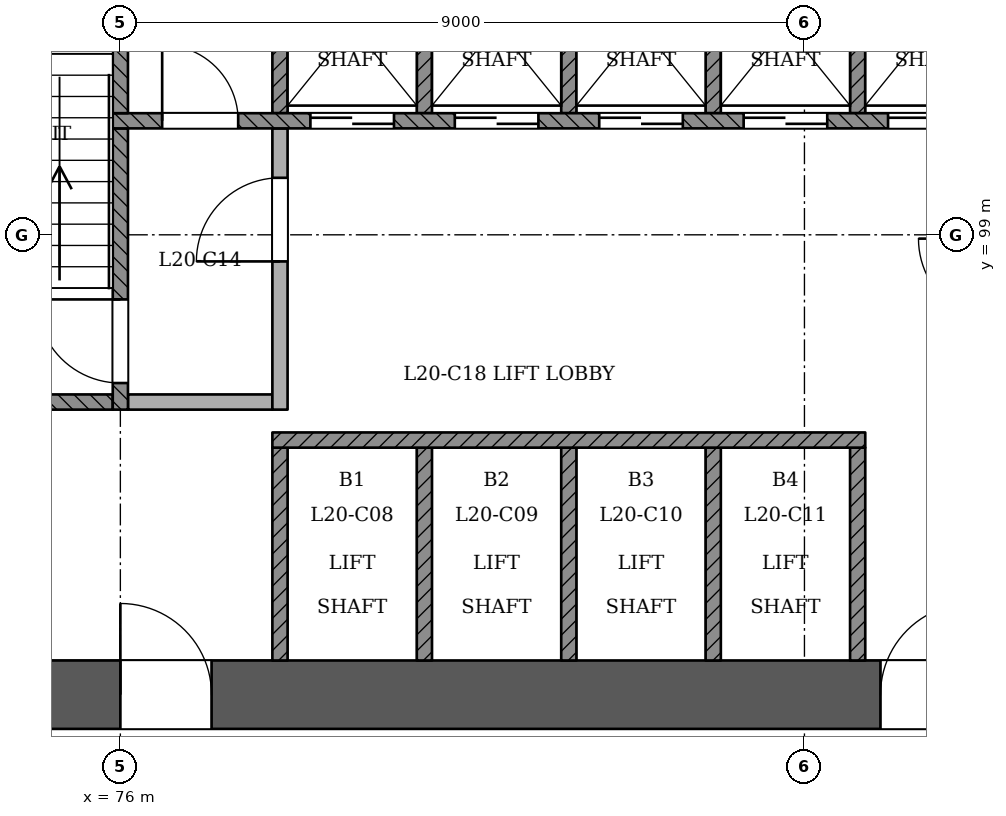
"""IFC4 building model, lengths in metres.
Left out: names, types, materials, properties, quantities, classifications, styles, units other than length and angle.
Written with IfcOpenShell. Run it as: python <this file> out.ifc"""

import sys

from ifc_helpers import new_model, si_unit, direction, frame, frame_2d, origin, place, context, subcontext, project, spatial, rectangle, extrude, element, fill, save


model = new_model("IFC4")
c1 = context("Model", 3, precision=1e-05, world=origin(), true_north=direction((0.0, 1.0)))
c2 = subcontext(c1, "Body", "Model", "MODEL_VIEW")
j1 = project(units=[si_unit("LENGTHUNIT", "METRE"), si_unit("PLANEANGLEUNIT", "RADIAN")], contexts=[c1])
p1 = place(None, origin())
s1 = spatial("IfcSite", under=j1, at=p1, CompositionType="ELEMENT")
p2 = place(p1, origin())
s2 = spatial("IfcBuilding", under=s1, at=p2, CompositionType="ELEMENT")
p3 = place(p2, frame((0.0, 0.0, 81.0)))
s3 = spatial("IfcBuildingStorey", under=s2, at=p3, CompositionType="ELEMENT", Elevation=81.0)
p4 = place(p3, frame((72.55, 92.95, 0.0), z_axis=(0.0, 0.0, 1.0), x_axis=(1.0, 0.0, 0.0)))
e1 = element("IfcWall", 1, at=p4, inside=s3, PredefinedType="SHEAR", context=c2, shape_type="SweptSolid", body=[
    extrude(rectangle(XDim=25.35, YDim=0.9, at=frame_2d((12.675, 0.0))), origin(), (0.0, 0.0, 1.0), 3.6),
])
p5 = place(p4, frame((1.25, 0.0, 0.0)))
e2 = element("IfcOpeningElement", 2, at=p5, cuts=e1, PredefinedType="OPENING", context=c2, shape_type="SweptSolid", body=[
    extrude(rectangle(XDim=1.2, YDim=2.1, at=frame_2d((0.6, 1.05))), frame((0.0, 0.46, 0.0), z_axis=(0.0, -1.0, 0.0), x_axis=(1.0, 0.0, 0.0)), (0.0, 0.0, 1.0), 0.921),
])
p6 = place(p4, frame((3.45, 0.0, 0.0)))
e3 = element("IfcOpeningElement", 3, at=p6, cuts=e1, PredefinedType="OPENING", context=c2, shape_type="SweptSolid", body=[
    extrude(rectangle(XDim=1.2, YDim=2.1, at=frame_2d((0.6, 1.05))), frame((0.0, 0.46, 0.0), z_axis=(0.0, -1.0, 0.0), x_axis=(1.0, 0.0, 0.0)), (0.0, 0.0, 1.0), 0.921),
])
p7 = place(p4, frame((13.45, 0.0, 0.0)))
e4 = element("IfcOpeningElement", 4, at=p7, cuts=e1, PredefinedType="OPENING", context=c2, shape_type="SweptSolid", body=[
    extrude(rectangle(XDim=1.2, YDim=2.1, at=frame_2d((0.6, 1.05))), frame((0.0, 0.46, 0.0), z_axis=(0.0, -1.0, 0.0), x_axis=(1.0, 0.0, 0.0)), (0.0, 0.0, 1.0), 0.921),
])
p8 = place(p4, frame((15.913, 0.0, 0.0)))
e5 = element("IfcOpeningElement", 5, at=p8, cuts=e1, PredefinedType="OPENING", context=c2, shape_type="SweptSolid", body=[
    extrude(rectangle(XDim=1.0, YDim=2.1, at=frame_2d((0.5, 1.05))), frame((0.0, 0.46, 0.0), z_axis=(0.0, -1.0, 0.0), x_axis=(1.0, 0.0, 0.0)), (0.0, 0.0, 1.0), 0.921),
])
p9 = place(p4, frame((18.35, 0.0, 0.0)))
e6 = element("IfcOpeningElement", 6, at=p9, cuts=e1, PredefinedType="OPENING", context=c2, shape_type="SweptSolid", body=[
    extrude(rectangle(XDim=1.0, YDim=2.1, at=frame_2d((0.5, 1.05))), frame((0.0, 0.46, 0.0), z_axis=(0.0, -1.0, 0.0), x_axis=(1.0, 0.0, 0.0)), (0.0, 0.0, 1.0), 0.921),
])
p10 = place(p4, frame((20.7, 0.0, 0.0)))
e7 = element("IfcOpeningElement", 7, at=p10, cuts=e1, PredefinedType="OPENING", context=c2, shape_type="SweptSolid", body=[
    extrude(rectangle(XDim=1.0, YDim=2.1, at=frame_2d((0.5, 1.05))), frame((0.0, 0.46, 0.0), z_axis=(0.0, -1.0, 0.0), x_axis=(1.0, 0.0, 0.0)), (0.0, 0.0, 1.0), 0.921),
])
p11 = place(p4, frame((22.988, 0.0, 0.0)))
e8 = element("IfcOpeningElement", 8, at=p11, cuts=e1, PredefinedType="OPENING", context=c2, shape_type="SweptSolid", body=[
    extrude(rectangle(XDim=1.0, YDim=2.1, at=frame_2d((0.5, 1.05))), frame((0.0, 0.46, 0.0), z_axis=(0.0, -1.0, 0.0), x_axis=(1.0, 0.0, 0.0)), (0.0, 0.0, 1.0), 0.921),
])
p12 = place(p3, frame((62.955, 97.34, 0.0), z_axis=(0.0, 0.0, 1.0), x_axis=(0.500000604257, -0.866025054916, 0.0)))
e9 = element("IfcWall", 9, at=p12, inside=s3, PredefinedType="PARTITIONING", context=c2, shape_type="SweptSolid", body=[
    extrude(rectangle(XDim=42.75, YDim=0.15, at=frame_2d((21.375, 0.0))), origin(), (0.0, 0.0, 1.0), 2.7),
])
p13 = place(p12, frame((0.245, 0.0, 0.0)))
e10 = element("IfcOpeningElement", 10, at=p13, cuts=e9, PredefinedType="OPENING", context=c2, shape_type="SweptSolid", body=[
    extrude(rectangle(XDim=1.2, YDim=2.1, at=frame_2d((0.6, 1.05))), frame((0.0, 0.085, 0.0), z_axis=(0.0, -1.0, 0.0), x_axis=(1.0, 0.0, 0.0)), (0.0, 0.0, 1.0), 0.171),
])
p14 = place(p12, frame((8.375, 0.0, 0.0)))
e11 = element("IfcOpeningElement", 11, at=p14, cuts=e9, PredefinedType="OPENING", context=c2, shape_type="SweptSolid", body=[
    extrude(rectangle(XDim=1.2, YDim=2.1, at=frame_2d((0.6, 1.05))), frame((0.0, 0.085, 0.0), z_axis=(0.0, -1.0, 0.0), x_axis=(1.0, 0.0, 0.0)), (0.0, 0.0, 1.0), 0.171),
])
p15 = place(p12, frame((14.125, 0.0, 0.0)))
e12 = element("IfcOpeningElement", 12, at=p15, cuts=e9, PredefinedType="OPENING", context=c2, shape_type="SweptSolid", body=[
    extrude(rectangle(XDim=1.0, YDim=2.1, at=frame_2d((0.5, 1.05))), frame((0.0, 0.085, 0.0), z_axis=(0.0, -1.0, 0.0), x_axis=(1.0, 0.0, 0.0)), (0.0, 0.0, 1.0), 0.171),
])
p16 = place(p12, frame((18.625, 0.0, 0.0)))
e13 = element("IfcOpeningElement", 13, at=p16, cuts=e9, PredefinedType="OPENING", context=c2, shape_type="SweptSolid", body=[
    extrude(rectangle(XDim=1.0, YDim=2.1, at=frame_2d((0.5, 1.05))), frame((0.0, 0.085, 0.0), z_axis=(0.0, -1.0, 0.0), x_axis=(1.0, 0.0, 0.0)), (0.0, 0.0, 1.0), 0.171),
])
p17 = place(p12, frame((26.375, 0.0, 0.0)))
e14 = element("IfcOpeningElement", 14, at=p17, cuts=e9, PredefinedType="OPENING", context=c2, shape_type="SweptSolid", body=[
    extrude(rectangle(XDim=1.2, YDim=2.1, at=frame_2d((0.6, 1.05))), frame((0.0, 0.085, 0.0), z_axis=(0.0, -1.0, 0.0), x_axis=(1.0, 0.0, 0.0)), (0.0, 0.0, 1.0), 0.171),
])
p18 = place(p12, frame((30.946, 0.0, 0.0)))
e15 = element("IfcOpeningElement", 15, at=p18, cuts=e9, PredefinedType="OPENING", context=c2, shape_type="SweptSolid", body=[
    extrude(rectangle(XDim=1.1, YDim=2.1, at=frame_2d((0.55, 1.05))), frame((0.0, 0.085, 0.0), z_axis=(0.0, -1.0, 0.0), x_axis=(1.0, 0.0, 0.0)), (0.0, 0.0, 1.0), 0.171),
])
p19 = place(p12, frame((36.625, 0.0, 0.0)))
e16 = element("IfcOpeningElement", 16, at=p19, cuts=e9, PredefinedType="OPENING", context=c2, shape_type="SweptSolid", body=[
    extrude(rectangle(XDim=1.0, YDim=2.1, at=frame_2d((0.5, 1.05))), frame((0.0, 0.085, 0.0), z_axis=(0.0, -1.0, 0.0), x_axis=(1.0, 0.0, 0.0)), (0.0, 0.0, 1.0), 0.171),
])
p20 = place(p12, frame((41.329, 0.0, 0.0)))
e17 = element("IfcOpeningElement", 17, at=p20, cuts=e9, PredefinedType="OPENING", context=c2, shape_type="SweptSolid", body=[
    extrude(rectangle(XDim=1.2, YDim=2.1, at=frame_2d((0.6, 1.05))), frame((0.0, 0.085, 0.0), z_axis=(0.0, -1.0, 0.0), x_axis=(1.0, 0.0, 0.0)), (0.0, 0.0, 1.0), 0.171),
])
p21 = place(p3, frame((85.67, 60.317, 0.0), z_axis=(0.0, 0.0, 1.0), x_axis=(0.499998839017, 0.866026074077, 0.0)))
e18 = element("IfcWall", 18, at=p21, inside=s3, PredefinedType="PARTITIONING", context=c2, shape_type="SweptSolid", body=[
    extrude(rectangle(XDim=41.239, YDim=0.15, at=frame_2d((20.62, 0.0))), origin(), (0.0, 0.0, 1.0), 2.7),
])
p22 = place(p21, frame((3.246, 0.0, 0.0)))
e19 = element("IfcOpeningElement", 19, at=p22, cuts=e18, PredefinedType="OPENING", context=c2, shape_type="SweptSolid", body=[
    extrude(rectangle(XDim=1.2, YDim=2.1, at=frame_2d((0.6, 1.05))), frame((0.0, 0.085, 0.0), z_axis=(0.0, -1.0, 0.0), x_axis=(1.0, 0.0, 0.0)), (0.0, 0.0, 1.0), 0.171),
])
p23 = place(p21, frame((10.771, 0.0, 0.0)))
e20 = element("IfcOpeningElement", 20, at=p23, cuts=e18, PredefinedType="OPENING", context=c2, shape_type="SweptSolid", body=[
    extrude(rectangle(XDim=1.0, YDim=2.1, at=frame_2d((0.5, 1.05))), frame((0.0, 0.085, 0.0), z_axis=(0.0, -1.0, 0.0), x_axis=(1.0, 0.0, 0.0)), (0.0, 0.0, 1.0), 0.171),
])
p24 = place(p21, frame((14.125, 0.0, 0.0)))
e21 = element("IfcOpeningElement", 21, at=p24, cuts=e18, PredefinedType="OPENING", context=c2, shape_type="SweptSolid", body=[
    extrude(rectangle(XDim=1.0, YDim=2.1, at=frame_2d((0.5, 1.05))), frame((0.0, 0.085, 0.0), z_axis=(0.0, -1.0, 0.0), x_axis=(1.0, 0.0, 0.0)), (0.0, 0.0, 1.0), 0.171),
])
p25 = place(p21, frame((19.771, 0.0, 0.0)))
e22 = element("IfcOpeningElement", 22, at=p25, cuts=e18, PredefinedType="OPENING", context=c2, shape_type="SweptSolid", body=[
    extrude(rectangle(XDim=1.0, YDim=2.1, at=frame_2d((0.5, 1.05))), frame((0.0, 0.085, 0.0), z_axis=(0.0, -1.0, 0.0), x_axis=(1.0, 0.0, 0.0)), (0.0, 0.0, 1.0), 0.171),
])
p26 = place(p21, frame((21.98, 0.0, 0.0)))
e23 = element("IfcOpeningElement", 23, at=p26, cuts=e18, PredefinedType="OPENING", context=c2, shape_type="SweptSolid", body=[
    extrude(rectangle(XDim=1.0, YDim=2.1, at=frame_2d((0.5, 1.05))), frame((0.0, 0.085, 0.0), z_axis=(0.0, -1.0, 0.0), x_axis=(1.0, 0.0, 0.0)), (0.0, 0.0, 1.0), 0.171),
])
p27 = place(p21, frame((28.655, 0.0, 0.0)))
e24 = element("IfcOpeningElement", 24, at=p27, cuts=e18, PredefinedType="OPENING", context=c2, shape_type="SweptSolid", body=[
    extrude(rectangle(XDim=1.0, YDim=2.1, at=frame_2d((0.5, 1.05))), frame((0.0, 0.085, 0.0), z_axis=(0.0, -1.0, 0.0), x_axis=(1.0, 0.0, 0.0)), (0.0, 0.0, 1.0), 0.171),
])
p28 = place(p21, frame((35.382, 0.0, 0.0)))
e25 = element("IfcOpeningElement", 25, at=p28, cuts=e18, PredefinedType="OPENING", context=c2, shape_type="SweptSolid", body=[
    extrude(rectangle(XDim=1.2, YDim=2.1, at=frame_2d((0.6, 1.05))), frame((0.0, 0.085, 0.0), z_axis=(0.0, -1.0, 0.0), x_axis=(1.0, 0.0, 0.0)), (0.0, 0.0, 1.0), 0.171),
])
for number, where, z_axis, x_axis in (
    (26, (78.1, 93.4, 0.0), (0.0, 0.0, 1.0), (0.0, 1.0, 0.0)),
    (27, (80.0, 93.4, 0.0), (0.0, 0.0, 1.0), (0.0, 1.0, 0.0)),
    (28, (81.9, 93.4, 0.0), (0.0, 0.0, 1.0), (0.0, 1.0, 0.0)),
    (29, (83.8, 93.4, 0.0), (0.0, 0.0, 1.0), (0.0, 1.0, 0.0)),
    (30, (85.7, 93.4, 0.0), (0.0, 0.0, 1.0), (0.0, 1.0, 0.0)),
):
    element("IfcWall", number, at=place(p3, frame(where, z_axis=z_axis, x_axis=x_axis)), inside=s3, PredefinedType="SOLIDWALL", context=c2, shape_type="SweptSolid", body=[
        extrude(rectangle(XDim=2.8, YDim=0.2, at=frame_2d((1.4, 0.0))), origin(), (0.0, 0.0, 1.0), 3.1),
    ])
p29 = place(p3, frame((78.0, 96.3, 0.0), z_axis=(0.0, 0.0, 1.0), x_axis=(1.0, 0.0, 0.0)))
e31 = element("IfcWall", 31, at=p29, inside=s3, PredefinedType="SOLIDWALL", context=c2, shape_type="SweptSolid", body=[
    extrude(rectangle(XDim=7.8, YDim=0.2, at=frame_2d((3.9, 0.0))), origin(), (0.0, 0.0, 1.0), 3.1),
])
p30 = place(p3, frame((73.0, 96.8, 0.0), z_axis=(0.0, 0.0, 1.0), x_axis=(1.0, 0.0, 0.0)))
e32 = element("IfcWall", 32, at=p30, inside=s3, PredefinedType="SOLIDWALL", context=c2, shape_type="SweptSolid", body=[
    extrude(rectangle(XDim=2.9, YDim=0.2, at=frame_2d((1.45, 0.0))), origin(), (0.0, 0.0, 1.0), 3.1),
])
p31 = place(p3, frame((76.0, 96.7, 0.0), z_axis=(0.0, 0.0, 1.0), x_axis=(0.0, 1.0, 0.0)))
e33 = element("IfcWall", 33, at=p31, inside=s3, PredefinedType="SOLIDWALL", context=c2, shape_type="SweptSolid", body=[
    extrude(rectangle(XDim=3.7, YDim=0.2, at=frame_2d((1.85, 0.0))), origin(), (0.0, 0.0, 1.0), 3.1),
])
p32 = place(p31, frame((0.35, 0.0, 0.0)))
e34 = element("IfcOpeningElement", 34, at=p32, cuts=e33, PredefinedType="OPENING", context=c2, shape_type="SweptSolid", body=[
    extrude(rectangle(XDim=1.1, YDim=2.1, at=frame_2d((0.55, 1.05))), frame((0.0, 0.11, 0.0), z_axis=(0.0, -1.0, 0.0), x_axis=(1.0, 0.0, 0.0)), (0.0, 0.0, 1.0), 0.221),
])
p33 = place(p3, frame((76.1, 96.8, 0.0), z_axis=(0.0, 0.0, 1.0), x_axis=(1.0, 0.0, 0.0)))
e35 = element("IfcWall", 35, at=p33, inside=s3, PredefinedType="PARTITIONING", context=c2, shape_type="SweptSolid", body=[
    extrude(rectangle(XDim=1.9, YDim=0.2, at=frame_2d((0.95, 0.0))), origin(), (0.0, 0.0, 1.0), 3.1),
])
p34 = place(p3, frame((78.1, 96.7, 0.0), z_axis=(0.0, 0.0, 1.0), x_axis=(0.0, 1.0, 0.0)))
e36 = element("IfcWall", 36, at=p34, inside=s3, PredefinedType="PARTITIONING", context=c2, shape_type="SweptSolid", body=[
    extrude(rectangle(XDim=3.7, YDim=0.2, at=frame_2d((1.85, 0.0))), origin(), (0.0, 0.0, 1.0), 3.1),
])
p35 = place(p34, frame((1.95, 0.0, 0.0)))
e37 = element("IfcOpeningElement", 37, at=p35, cuts=e36, PredefinedType="OPENING", context=c2, shape_type="SweptSolid", body=[
    extrude(rectangle(XDim=1.1, YDim=2.1, at=frame_2d((0.55, 1.05))), frame((0.0, 0.11, 0.0), z_axis=(0.0, -1.0, 0.0), x_axis=(1.0, 0.0, 0.0)), (0.0, 0.0, 1.0), 0.221),
])
p36 = place(p3, frame((75.9, 100.5, 0.0), z_axis=(0.0, 0.0, 1.0), x_axis=(1.0, 0.0, 0.0)))
e38 = element("IfcWall", 38, at=p36, inside=s3, PredefinedType="SOLIDWALL", context=c2, shape_type="SweptSolid", body=[
    extrude(rectangle(XDim=18.2, YDim=0.2, at=frame_2d((9.1, 0.0))), origin(), (0.0, 0.0, 1.0), 3.1),
])
p37 = place(p36, frame((2.6, 0.0, 0.0)))
e39 = element("IfcOpeningElement", 39, at=p37, cuts=e38, PredefinedType="OPENING", context=c2, shape_type="SweptSolid", body=[
    extrude(rectangle(XDim=1.1, YDim=2.1, at=frame_2d((0.55, 1.05))), frame((0.0, 0.11, 0.0), z_axis=(0.0, -1.0, 0.0), x_axis=(1.0, 0.0, 0.0)), (0.0, 0.0, 1.0), 0.221),
])
p38 = place(p36, frame((4.5, 0.0, 0.0)))
e40 = element("IfcOpeningElement", 40, at=p38, cuts=e38, PredefinedType="OPENING", context=c2, shape_type="SweptSolid", body=[
    extrude(rectangle(XDim=1.1, YDim=2.1, at=frame_2d((0.55, 1.05))), frame((0.0, 0.11, 0.0), z_axis=(0.0, -1.0, 0.0), x_axis=(1.0, 0.0, 0.0)), (0.0, 0.0, 1.0), 0.221),
])
p39 = place(p36, frame((6.4, 0.0, 0.0)))
e41 = element("IfcOpeningElement", 41, at=p39, cuts=e38, PredefinedType="OPENING", context=c2, shape_type="SweptSolid", body=[
    extrude(rectangle(XDim=1.1, YDim=2.1, at=frame_2d((0.55, 1.05))), frame((0.0, 0.11, 0.0), z_axis=(0.0, -1.0, 0.0), x_axis=(1.0, 0.0, 0.0)), (0.0, 0.0, 1.0), 0.221),
])
p40 = place(p36, frame((8.3, 0.0, 0.0)))
e42 = element("IfcOpeningElement", 42, at=p40, cuts=e38, PredefinedType="OPENING", context=c2, shape_type="SweptSolid", body=[
    extrude(rectangle(XDim=1.1, YDim=2.1, at=frame_2d((0.55, 1.05))), frame((0.0, 0.11, 0.0), z_axis=(0.0, -1.0, 0.0), x_axis=(1.0, 0.0, 0.0)), (0.0, 0.0, 1.0), 0.221),
])
p41 = place(p36, frame((10.2, 0.0, 0.0)))
e43 = element("IfcOpeningElement", 43, at=p41, cuts=e38, PredefinedType="OPENING", context=c2, shape_type="SweptSolid", body=[
    extrude(rectangle(XDim=1.1, YDim=2.1, at=frame_2d((0.55, 1.05))), frame((0.0, 0.11, 0.0), z_axis=(0.0, -1.0, 0.0), x_axis=(1.0, 0.0, 0.0)), (0.0, 0.0, 1.0), 0.221),
])
p42 = place(p36, frame((12.1, 0.0, 0.0)))
e44 = element("IfcOpeningElement", 44, at=p42, cuts=e38, PredefinedType="OPENING", context=c2, shape_type="SweptSolid", body=[
    extrude(rectangle(XDim=1.1, YDim=2.1, at=frame_2d((0.55, 1.05))), frame((0.0, 0.11, 0.0), z_axis=(0.0, -1.0, 0.0), x_axis=(1.0, 0.0, 0.0)), (0.0, 0.0, 1.0), 0.221),
])
p43 = place(p36, frame((14.0, 0.0, 0.0)))
e45 = element("IfcOpeningElement", 45, at=p43, cuts=e38, PredefinedType="OPENING", context=c2, shape_type="SweptSolid", body=[
    extrude(rectangle(XDim=1.1, YDim=2.1, at=frame_2d((0.55, 1.05))), frame((0.0, 0.11, 0.0), z_axis=(0.0, -1.0, 0.0), x_axis=(1.0, 0.0, 0.0)), (0.0, 0.0, 1.0), 0.221),
])
p44 = place(p36, frame((0.65, 0.0, 0.0)))
e46 = element("IfcOpeningElement", 46, at=p44, cuts=e38, PredefinedType="OPENING", context=c2, shape_type="SweptSolid", body=[
    extrude(rectangle(XDim=1.0, YDim=2.1, at=frame_2d((0.5, 1.05))), frame((0.0, 0.11, 0.0), z_axis=(0.0, -1.0, 0.0), x_axis=(1.0, 0.0, 0.0)), (0.0, 0.0, 1.0), 0.221),
])
p45 = place(p36, frame((16.3, 0.0, 0.0)))
e47 = element("IfcOpeningElement", 47, at=p45, cuts=e38, PredefinedType="OPENING", context=c2, shape_type="SweptSolid", body=[
    extrude(rectangle(XDim=1.0, YDim=2.1, at=frame_2d((0.5, 1.05))), frame((0.0, 0.11, 0.0), z_axis=(0.0, -1.0, 0.0), x_axis=(1.0, 0.0, 0.0)), (0.0, 0.0, 1.0), 0.221),
])
for number, where, z_axis, x_axis in (
    (48, (76.0, 100.6, 0.0), (0.0, 0.0, 1.0), (0.0, 1.0, 0.0)),
    (49, (78.1, 100.6, 0.0), (0.0, 0.0, 1.0), (0.0, 1.0, 0.0)),
    (50, (80.0, 100.6, 0.0), (0.0, 0.0, 1.0), (0.0, 1.0, 0.0)),
    (51, (81.9, 100.6, 0.0), (0.0, 0.0, 1.0), (0.0, 1.0, 0.0)),
    (52, (83.8, 100.6, 0.0), (0.0, 0.0, 1.0), (0.0, 1.0, 0.0)),
    (53, (85.7, 100.6, 0.0), (0.0, 0.0, 1.0), (0.0, 1.0, 0.0)),
):
    element("IfcWall", number, at=place(p3, frame(where, z_axis=z_axis, x_axis=x_axis)), inside=s3, PredefinedType="SOLIDWALL", context=c2, shape_type="SweptSolid", body=[
        extrude(rectangle(XDim=2.8, YDim=0.2, at=frame_2d((1.4, 0.0))), origin(), (0.0, 0.0, 1.0), 3.1),
    ])
p46 = place(p37, origin())
e54 = element("IfcDoor", 54, at=p46, inside=s3, OperationType="SLIDING_TO_RIGHT", PredefinedType="NOTDEFINED", context=c2, shape_type="SweptSolid", body=[
    extrude(rectangle(XDim=1.1, YDim=2.1, at=frame_2d((0.55, 1.05))), frame((0.0, 0.025, 0.0), z_axis=(0.0, -1.0, 0.0), x_axis=(1.0, 0.0, 0.0)), (0.0, 0.0, 1.0), 0.05),
])
fill(e39, e54)
p47 = place(p38, origin())
e55 = element("IfcDoor", 55, at=p47, inside=s3, OperationType="SLIDING_TO_LEFT", PredefinedType="NOTDEFINED", context=c2, shape_type="SweptSolid", body=[
    extrude(rectangle(XDim=1.1, YDim=2.1, at=frame_2d((0.55, 1.05))), frame((0.0, 0.025, 0.0), z_axis=(0.0, -1.0, 0.0), x_axis=(1.0, 0.0, 0.0)), (0.0, 0.0, 1.0), 0.05),
])
fill(e40, e55)
p48 = place(p39, origin())
e56 = element("IfcDoor", 56, at=p48, inside=s3, OperationType="SLIDING_TO_RIGHT", PredefinedType="NOTDEFINED", context=c2, shape_type="SweptSolid", body=[
    extrude(rectangle(XDim=1.1, YDim=2.1, at=frame_2d((0.55, 1.05))), frame((0.0, 0.025, 0.0), z_axis=(0.0, -1.0, 0.0), x_axis=(1.0, 0.0, 0.0)), (0.0, 0.0, 1.0), 0.05),
])
fill(e41, e56)
p49 = place(p40, origin())
e57 = element("IfcDoor", 57, at=p49, inside=s3, OperationType="SLIDING_TO_LEFT", PredefinedType="NOTDEFINED", context=c2, shape_type="SweptSolid", body=[
    extrude(rectangle(XDim=1.1, YDim=2.1, at=frame_2d((0.55, 1.05))), frame((0.0, 0.025, 0.0), z_axis=(0.0, -1.0, 0.0), x_axis=(1.0, 0.0, 0.0)), (0.0, 0.0, 1.0), 0.05),
])
fill(e42, e57)
p50 = place(p41, origin())
e58 = element("IfcDoor", 58, at=p50, inside=s3, OperationType="SLIDING_TO_RIGHT", PredefinedType="NOTDEFINED", context=c2, shape_type="SweptSolid", body=[
    extrude(rectangle(XDim=1.1, YDim=2.1, at=frame_2d((0.55, 1.05))), frame((0.0, 0.025, 0.0), z_axis=(0.0, -1.0, 0.0), x_axis=(1.0, 0.0, 0.0)), (0.0, 0.0, 1.0), 0.05),
])
fill(e43, e58)
p51 = place(p32, origin())
e59 = element("IfcDoor", 59, at=p51, inside=s3, OperationType="SINGLE_SWING_RIGHT", PredefinedType="NOTDEFINED", context=c2, shape_type="SweptSolid", body=[
    extrude(rectangle(XDim=1.1, YDim=2.1, at=frame_2d((0.55, 1.05))), frame((0.0, 0.025, 0.0), z_axis=(0.0, -1.0, 0.0), x_axis=(1.0, 0.0, 0.0)), (0.0, 0.0, 1.0), 0.05),
])
fill(e34, e59)
p52 = place(p35, origin())
e60 = element("IfcDoor", 60, at=p52, inside=s3, OperationType="SINGLE_SWING_LEFT", PredefinedType="NOTDEFINED", context=c2, shape_type="SweptSolid", body=[
    extrude(rectangle(XDim=1.1, YDim=2.1, at=frame_2d((0.55, 1.05))), frame((0.0, 0.025, 0.0), z_axis=(0.0, -1.0, 0.0), x_axis=(1.0, 0.0, 0.0)), (0.0, 0.0, 1.0), 0.05),
])
fill(e37, e60)
p53 = place(p6, origin())
e61 = element("IfcDoor", 61, at=p53, inside=s3, OperationType="SINGLE_SWING_LEFT", PredefinedType="NOTDEFINED", context=c2, shape_type="SweptSolid", body=[
    extrude(rectangle(XDim=1.2, YDim=2.1, at=frame_2d((0.6, 1.05))), frame((0.0, 0.025, 0.0), z_axis=(0.0, -1.0, 0.0), x_axis=(1.0, 0.0, 0.0)), (0.0, 0.0, 1.0), 0.05),
])
fill(e3, e61)
p54 = place(p7, origin())
e62 = element("IfcDoor", 62, at=p54, inside=s3, OperationType="SINGLE_SWING_RIGHT", PredefinedType="NOTDEFINED", context=c2, shape_type="SweptSolid", body=[
    extrude(rectangle(XDim=1.2, YDim=2.1, at=frame_2d((0.6, 1.05))), frame((0.0, 0.025, 0.0), z_axis=(0.0, -1.0, 0.0), x_axis=(1.0, 0.0, 0.0)), (0.0, 0.0, 1.0), 0.05),
])
fill(e4, e62)
p55 = place(p44, origin())
e63 = element("IfcDoor", 63, at=p55, inside=s3, OperationType="SINGLE_SWING_LEFT", PredefinedType="NOTDEFINED", context=c2, shape_type="SweptSolid", body=[
    extrude(rectangle(XDim=1.0, YDim=2.1, at=frame_2d((0.5, 1.05))), frame((0.0, 0.025, 0.0), z_axis=(0.0, -1.0, 0.0), x_axis=(1.0, 0.0, 0.0)), (0.0, 0.0, 1.0), 0.05),
])
fill(e46, e63)
save(model, sys.argv[1])
